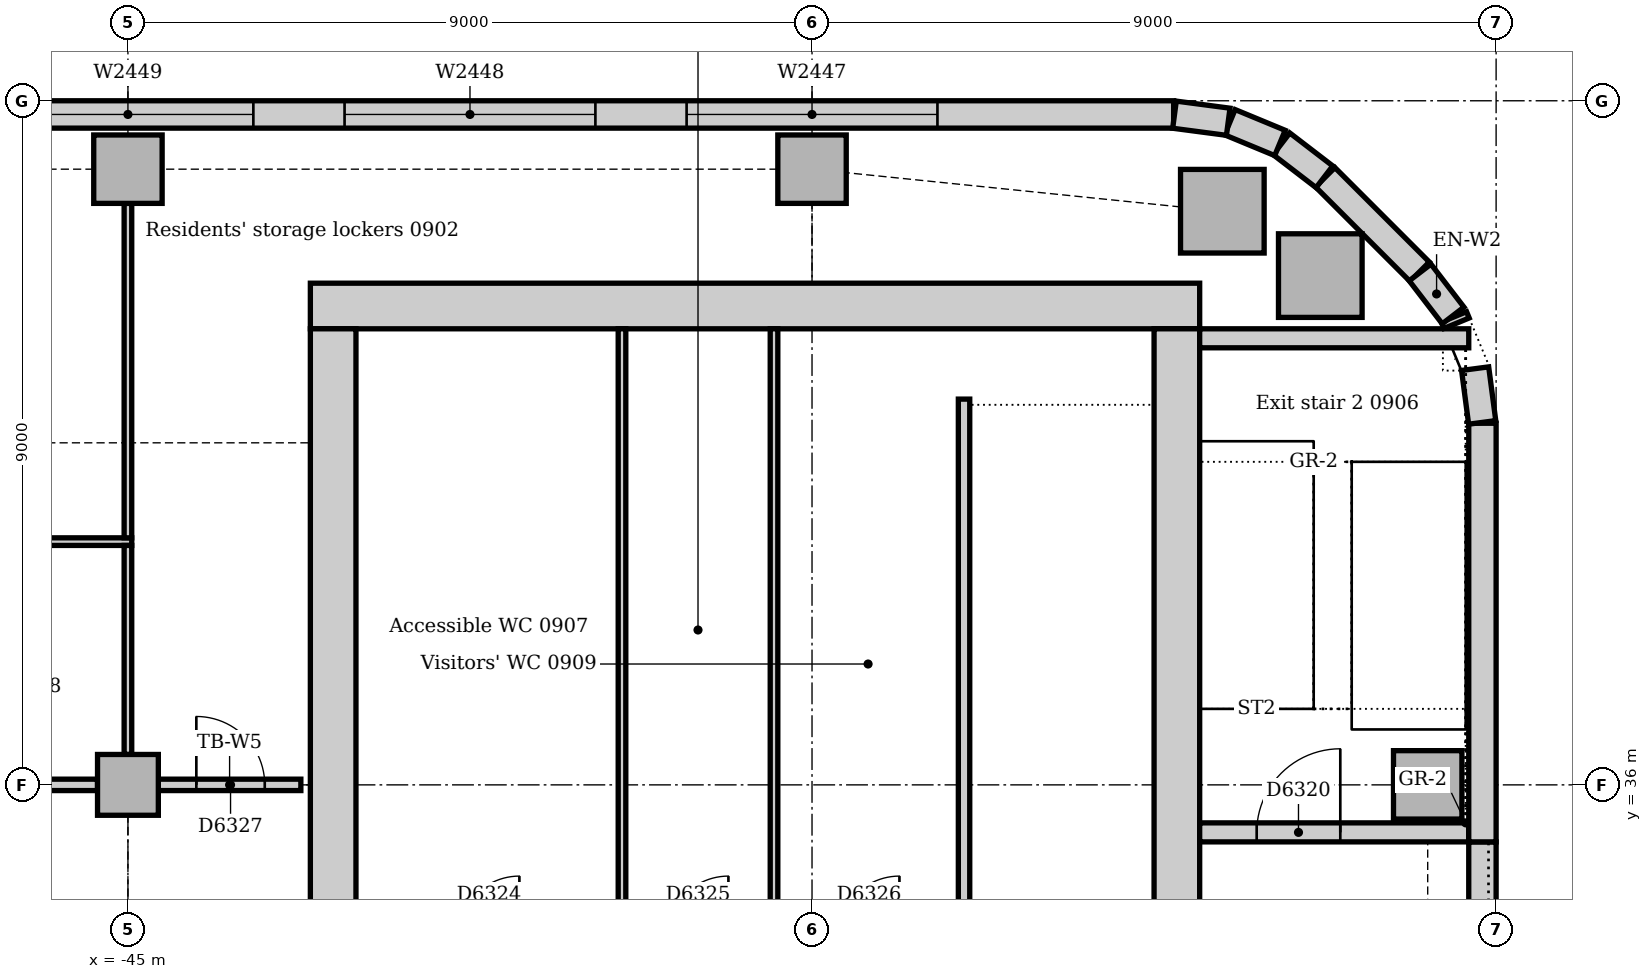
"""IFC4 building model, lengths in metres.
Left out: names, types, materials, properties, quantities, classifications, styles, units other than length and angle.
Written with IfcOpenShell. Run it as: python <this file> out.ifc"""

import sys

from ifc_helpers import new_model, si_unit, direction, frame, frame_2d, origin, origin_2d, place, context, subcontext, project, spatial, rectangle, extrude, element, fill, save


model = new_model("IFC4")
c1 = context("Model", 3, precision=1e-05, world=origin(), true_north=direction((0.0, 1.0)))
c2 = subcontext(c1, "Body", "Model", "MODEL_VIEW")
j1 = project(units=[si_unit("LENGTHUNIT", "METRE"), si_unit("PLANEANGLEUNIT", "RADIAN")], contexts=[c1])
p1 = place(None, origin())
s1 = spatial("IfcSite", under=j1, at=p1, CompositionType="ELEMENT")
p2 = place(p1, origin())
s2 = spatial("IfcBuilding", under=s1, at=p2, CompositionType="ELEMENT")
p3 = place(p2, frame((0.0, 0.0, 42.0)))
s3 = spatial("IfcBuildingStorey", under=s2, at=p3, CompositionType="ELEMENT", Elevation=42.0)
p4 = place(p3, frame((-30.9, 42.3, 0.0), z_axis=(0.0, 0.0, 1.0), x_axis=(-1.0, 0.0, 0.0)))
e1 = element("IfcWall", 1, at=p4, inside=s3, PredefinedType="SOLIDWALL", context=c2, shape_type="SweptSolid", body=[
    extrude(rectangle(XDim=11.7, YDim=0.6, at=frame_2d((5.85, 0.0))), origin(), (0.0, 0.0, 1.0), 4.0),
])
p5 = place(p3, frame((-31.2, 30.5, 0.0), z_axis=(0.0, 0.0, 1.0), x_axis=(0.0, 1.0, 0.0)))
e2 = element("IfcWall", 2, at=p5, inside=s3, PredefinedType="SOLIDWALL", context=c2, shape_type="SweptSolid", body=[
    extrude(rectangle(XDim=11.5, YDim=0.6, at=frame_2d((5.75, 0.0))), origin(), (0.0, 0.0, 1.0), 4.0),
])
p6 = place(p5, frame((0.85, 0.0, 0.0)))
e3 = element("IfcOpeningElement", 3, at=p6, cuts=e2, PredefinedType="OPENING", context=c2, shape_type="SweptSolid", body=[
    extrude(rectangle(XDim=1.8, YDim=2.1, at=frame_2d((0.9, 1.05))), frame((0.0, 0.31, 0.0), z_axis=(0.0, -1.0, 0.0), x_axis=(1.0, 0.0, 0.0)), (0.0, 0.0, 1.0), 0.62),
])
p7 = place(p3, frame((-42.3, 42.0, 0.0), z_axis=(0.0, 0.0, 1.0), x_axis=(0.0, -1.0, 0.0)))
e4 = element("IfcWall", 4, at=p7, inside=s3, PredefinedType="SOLIDWALL", context=c2, shape_type="SweptSolid", body=[
    extrude(rectangle(XDim=11.5, YDim=0.6, at=frame_2d((5.75, 0.0))), origin(), (0.0, 0.0, 1.0), 4.0),
])
p8 = place(p7, frame((8.85, 0.0, 0.0)))
e5 = element("IfcOpeningElement", 5, at=p8, cuts=e4, PredefinedType="OPENING", context=c2, shape_type="SweptSolid", body=[
    extrude(rectangle(XDim=1.8, YDim=2.1, at=frame_2d((0.9, 1.05))), frame((0.0, 0.31, 0.0), z_axis=(0.0, -1.0, 0.0), x_axis=(1.0, 0.0, 0.0)), (0.0, 0.0, 1.0), 0.62),
])
p9 = place(p3, frame((-30.9, 35.375, 0.0), z_axis=(0.0, 0.0, 1.0), x_axis=(1.0, 0.0, 0.0)))
e6 = element("IfcWall", 6, at=p9, inside=s3, PredefinedType="SOLIDWALL", context=c2, shape_type="SweptSolid", body=[
    extrude(rectangle(XDim=3.54, YDim=0.25, at=frame_2d((1.77, 0.0))), origin(), (0.0, 0.0, 1.0), 4.0),
])
p10 = place(p9, frame((0.75, 0.0, 0.0)))
e7 = element("IfcOpeningElement", 7, at=p10, cuts=e6, PredefinedType="OPENING", context=c2, shape_type="SweptSolid", body=[
    extrude(rectangle(XDim=1.1, YDim=2.1, at=frame_2d((0.55, 1.05))), frame((0.0, 0.135, 0.0), z_axis=(0.0, -1.0, 0.0), x_axis=(1.0, 0.0, 0.0)), (0.0, 0.0, 1.0), 0.27),
])
p11 = place(p3, frame((-27.36, 41.875, 0.0), z_axis=(0.0, 0.0, 1.0), x_axis=(-1.0, 0.0, 0.0)))
e8 = element("IfcWall", 8, at=p11, inside=s3, PredefinedType="SOLIDWALL", context=c2, shape_type="SweptSolid", body=[
    extrude(rectangle(XDim=3.54, YDim=0.25, at=frame_2d((1.77, 0.0))), origin(), (0.0, 0.0, 1.0), 4.0),
])
for number, where, z_axis, x_axis in (
    (9, (-29.313, 42.7, 0.0), (0.0, 0.0, 1.0), (1.0, 0.0, 0.0)),
    (10, (-30.602, 43.547, 0.0), (0.0, 0.0, 1.0), (1.0, 0.0, 0.0)),
):
    element("IfcColumn", number, at=place(p3, frame(where, z_axis=z_axis, x_axis=x_axis)), inside=s3, PredefinedType="COLUMN", context=c2, shape_type="SweptSolid", body=[
        extrude(rectangle(XDim=1.1, YDim=1.1, at=origin_2d()), origin(), (0.0, 0.0, 1.0), 3.7),
    ])
p12 = place(p3, frame((-27.9, 36.0, 0.0), z_axis=(0.0, 0.0, 1.0), x_axis=(1.0, 0.0, 0.0)))
e11 = element("IfcColumn", 11, at=p12, inside=s3, PredefinedType="COLUMN", context=c2, shape_type="SweptSolid", body=[
    extrude(rectangle(XDim=0.9, YDim=0.9, at=origin_2d()), origin(), (0.0, 0.0, 1.0), 4.0),
])
for number, where, z_axis, x_axis in (
    (12, (-45.0, 44.1, 0.0), (0.0, 0.0, 1.0), (1.0, 0.0, 0.0)),
    (13, (-36.0, 44.1, 0.0), (0.0, 0.0, 1.0), (1.0, 0.0, 0.0)),
):
    element("IfcColumn", number, at=place(p3, frame(where, z_axis=z_axis, x_axis=x_axis)), inside=s3, PredefinedType="COLUMN", context=c2, shape_type="SweptSolid", body=[
        extrude(rectangle(XDim=0.9, YDim=0.9, at=origin_2d()), origin(), (0.0, 0.0, 1.0), 3.7),
    ])
p13 = place(p3, frame((-45.0, 36.0, 0.0), z_axis=(0.0, 0.0, 1.0), x_axis=(1.0, 0.0, 0.0)))
e14 = element("IfcColumn", 14, at=p13, inside=s3, PredefinedType="COLUMN", context=c2, shape_type="SweptSolid", body=[
    extrude(rectangle(XDim=0.8, YDim=0.8, at=origin_2d()), origin(), (0.0, 0.0, 1.0), 3.7),
])
p14 = place(p3, frame((-27.18, 27.75, 0.0), z_axis=(0.0, 0.0, 1.0), x_axis=(0.0, 1.0, 0.0)))
e15 = element("IfcWall", 15, at=p14, inside=s3, PredefinedType="STANDARD", context=c2, shape_type="SweptSolid", body=[
    extrude(rectangle(XDim=7.5, YDim=0.36, at=frame_2d((3.75, 0.0))), origin(), (0.0, 0.0, 1.0), 3.7),
])
p15 = place(p14, frame((2.85, 0.0, 1.2)))
e16 = element("IfcOpeningElement", 16, at=p15, cuts=e15, PredefinedType="OPENING", context=c2, shape_type="SweptSolid", body=[
    extrude(rectangle(XDim=1.8, YDim=1.2, at=frame_2d((0.9, 0.6))), frame((0.0, 0.19, 0.0), z_axis=(0.0, -1.0, 0.0), x_axis=(1.0, 0.0, 0.0)), (0.0, 0.0, 1.0), 0.38),
])
p16 = place(p3, frame((-27.18, 35.25, 0.0), z_axis=(0.0, 0.0, 1.0), x_axis=(0.0, 1.0, 0.0)))
e17 = element("IfcWall", 17, at=p16, inside=s3, PredefinedType="STANDARD", context=c2, shape_type="SweptSolid", body=[
    extrude(rectangle(XDim=5.507, YDim=0.36, at=frame_2d((2.754, 0.0))), origin(), (0.0, 0.0, 1.0), 3.7),
])
p17 = place(p3, frame((-28.006, 42.751, 0.0), z_axis=(0.0, 0.0, 1.0), x_axis=(-0.707106781187, 0.707106781187, 0.0)))
e18 = element("IfcWall", 18, at=p17, inside=s3, PredefinedType="STANDARD", context=c2, shape_type="SweptSolid", body=[
    extrude(rectangle(XDim=1.757, YDim=0.36, at=frame_2d((0.879, 0.0))), origin(), (0.0, 0.0, 1.0), 3.7),
])
p18 = place(p3, frame((-31.243, 44.82, 0.0), z_axis=(0.0, 0.0, 1.0), x_axis=(-1.0, 0.0, 0.0)))
e19 = element("IfcWall", 19, at=p18, inside=s3, PredefinedType="STANDARD", context=c2, shape_type="SweptSolid", body=[
    extrude(rectangle(XDim=36.515, YDim=0.36, at=frame_2d((18.257, 0.0))), origin(), (0.0, 0.0, 1.0), 3.7),
])
p19 = place(p18, frame((3.107, 0.0, 0.9)))
e20 = element("IfcOpeningElement", 20, at=p19, cuts=e19, PredefinedType="OPENING", context=c2, shape_type="SweptSolid", body=[
    extrude(rectangle(XDim=3.3, YDim=1.6, at=frame_2d((1.65, 0.8))), frame((0.0, 0.19, 0.0), z_axis=(0.0, -1.0, 0.0), x_axis=(1.0, 0.0, 0.0)), (0.0, 0.0, 1.0), 0.38),
])
p20 = place(p18, frame((7.607, 0.0, 0.9)))
e21 = element("IfcOpeningElement", 21, at=p20, cuts=e19, PredefinedType="OPENING", context=c2, shape_type="SweptSolid", body=[
    extrude(rectangle(XDim=3.3, YDim=1.6, at=frame_2d((1.65, 0.8))), frame((0.0, 0.19, 0.0), z_axis=(0.0, -1.0, 0.0), x_axis=(1.0, 0.0, 0.0)), (0.0, 0.0, 1.0), 0.38),
])
p21 = place(p18, frame((12.107, 0.0, 0.9)))
e22 = element("IfcOpeningElement", 22, at=p21, cuts=e19, PredefinedType="OPENING", context=c2, shape_type="SweptSolid", body=[
    extrude(rectangle(XDim=3.3, YDim=1.6, at=frame_2d((1.65, 0.8))), frame((0.0, 0.19, 0.0), z_axis=(0.0, -1.0, 0.0), x_axis=(1.0, 0.0, 0.0)), (0.0, 0.0, 1.0), 0.38),
])
p22 = place(p18, frame((16.607, 0.0, 0.9)))
e23 = element("IfcOpeningElement", 23, at=p22, cuts=e19, PredefinedType="OPENING", context=c2, shape_type="SweptSolid", body=[
    extrude(rectangle(XDim=3.3, YDim=1.6, at=frame_2d((1.65, 0.8))), frame((0.0, 0.19, 0.0), z_axis=(0.0, -1.0, 0.0), x_axis=(1.0, 0.0, 0.0)), (0.0, 0.0, 1.0), 0.38),
])
p23 = place(p18, frame((21.107, 0.0, 0.9)))
e24 = element("IfcOpeningElement", 24, at=p23, cuts=e19, PredefinedType="OPENING", context=c2, shape_type="SweptSolid", body=[
    extrude(rectangle(XDim=3.3, YDim=1.6, at=frame_2d((1.65, 0.8))), frame((0.0, 0.19, 0.0), z_axis=(0.0, -1.0, 0.0), x_axis=(1.0, 0.0, 0.0)), (0.0, 0.0, 1.0), 0.38),
])
p24 = place(p18, frame((25.607, 0.0, 0.9)))
e25 = element("IfcOpeningElement", 25, at=p24, cuts=e19, PredefinedType="OPENING", context=c2, shape_type="SweptSolid", body=[
    extrude(rectangle(XDim=3.3, YDim=1.6, at=frame_2d((1.65, 0.8))), frame((0.0, 0.19, 0.0), z_axis=(0.0, -1.0, 0.0), x_axis=(1.0, 0.0, 0.0)), (0.0, 0.0, 1.0), 0.38),
])
p25 = place(p18, frame((30.107, 0.0, 0.9)))
e26 = element("IfcOpeningElement", 26, at=p25, cuts=e19, PredefinedType="OPENING", context=c2, shape_type="SweptSolid", body=[
    extrude(rectangle(XDim=3.3, YDim=1.6, at=frame_2d((1.65, 0.8))), frame((0.0, 0.19, 0.0), z_axis=(0.0, -1.0, 0.0), x_axis=(1.0, 0.0, 0.0)), (0.0, 0.0, 1.0), 0.38),
])
p26 = place(p3, frame((-27.183, 40.769, 0.0), z_axis=(0.0, 0.0, 1.0), x_axis=(-0.13055608231, 0.99144092581, 0.0)))
e27 = element("IfcWall", 27, at=p26, inside=s3, PredefinedType="STANDARD", context=c2, shape_type="SweptSolid", body=[
    extrude(rectangle(XDim=0.713, YDim=0.36, at=frame_2d((0.356, 0.0))), origin(), (0.0, 0.0, 1.0), 3.7),
])
p27 = place(p3, frame((-27.521, 42.074, 0.0), z_axis=(0.0, 0.0, 1.0), x_axis=(-0.382549378284, 0.923935048136, 0.0)))
e28 = element("IfcWall", 28, at=p27, inside=s3, PredefinedType="STANDARD", context=c2, shape_type="SweptSolid", body=[
    extrude(rectangle(XDim=0.089, YDim=0.36, at=frame_2d((0.045, 0.0))), origin(), (0.0, 0.0, 1.0), 3.7),
])
for number, where, z_axis, x_axis in (
    (29, (-27.566, 42.175, 0.0), (0.0, 0.0, 1.0), (-0.609, 0.793, 0.0)),
    (30, (-29.259, 44.0, 0.0), (0.0, 0.0, 1.0), (-0.793, 0.609, 0.0)),
):
    element("IfcWall", number, at=place(p3, frame(where, z_axis=z_axis, x_axis=x_axis)), inside=s3, PredefinedType="STANDARD", context=c2, shape_type="SweptSolid", body=[
        extrude(rectangle(XDim=0.713, YDim=0.36, at=frame_2d((0.357, 0.0))), origin(), (0.0, 0.0, 1.0), 3.7),
    ])
for number, where, z_axis, x_axis in (
    (31, (-29.844, 44.445, 0.0), (0.0, 0.0, 1.0), (-0.924, 0.383, 0.0)),
    (32, (-30.524, 44.724, 0.0), (0.0, 0.0, 1.0), (-0.991, 0.131, 0.0)),
):
    element("IfcWall", number, at=place(p3, frame(where, z_axis=z_axis, x_axis=x_axis)), inside=s3, PredefinedType="STANDARD", context=c2, shape_type="SweptSolid", body=[
        extrude(rectangle(XDim=0.713, YDim=0.36, at=frame_2d((0.356, 0.0))), origin(), (0.0, 0.0, 1.0), 3.7),
    ])
p28 = place(p3, frame((-34.0, 41.075, 0.0), z_axis=(0.0, 0.0, 1.0), x_axis=(0.0, -1.0, 0.0)))
e33 = element("IfcWall", 33, at=p28, inside=s3, PredefinedType="SOLIDWALL", context=c2, shape_type="SweptSolid", body=[
    extrude(rectangle(XDim=7.0, YDim=0.15, at=frame_2d((3.5, 0.0))), origin(), (0.0, 0.0, 1.0), 4.0),
])
for number, where, z_axis, x_axis in (
    (34, (-38.5, 34.075, 0.0), (0.0, 0.0, 1.0), (0.0, 1.0, 0.0)),
    (35, (-36.5, 34.075, 0.0), (0.0, 0.0, 1.0), (0.0, 1.0, 0.0)),
):
    element("IfcWall", number, at=place(p3, frame(where, z_axis=z_axis, x_axis=x_axis)), inside=s3, PredefinedType="PARTITIONING", context=c2, shape_type="SweptSolid", body=[
        extrude(rectangle(XDim=7.925, YDim=0.1, at=frame_2d((3.962, 0.0))), origin(), (0.0, 0.0, 1.0), 3.7),
    ])
p29 = place(p3, frame((-44.6, 36.0, 0.0), z_axis=(0.0, 0.0, 1.0), x_axis=(1.0, 0.0, 0.0)))
e36 = element("IfcWall", 36, at=p29, inside=s3, PredefinedType="PARTITIONING", context=c2, shape_type="SweptSolid", body=[
    extrude(rectangle(XDim=1.875, YDim=0.15, at=frame_2d((0.938, 0.0))), origin(), (0.0, 0.0, 1.0), 3.452),
])
p30 = place(p29, frame((0.5, 0.0, 0.0)))
e37 = element("IfcOpeningElement", 37, at=p30, cuts=e36, PredefinedType="OPENING", context=c2, shape_type="SweptSolid", body=[
    extrude(rectangle(XDim=0.9, YDim=2.1, at=frame_2d((0.45, 1.05))), frame((0.0, 0.085, 0.0), z_axis=(0.0, -1.0, 0.0), x_axis=(1.0, 0.0, 0.0)), (0.0, 0.0, 1.0), 0.17),
])
p31 = place(p3, frame((-53.6, 36.0, 0.0), z_axis=(0.0, 0.0, 1.0), x_axis=(1.0, 0.0, 0.0)))
e38 = element("IfcWall", 38, at=p31, inside=s3, PredefinedType="PARTITIONING", context=c2, shape_type="SweptSolid", body=[
    extrude(rectangle(XDim=8.2, YDim=0.15, at=frame_2d((4.1, 0.0))), origin(), (0.0, 0.0, 1.0), 3.0),
])
p32 = place(p31, frame((2.89, 0.0, 0.0)))
e39 = element("IfcOpeningElement", 39, at=p32, cuts=e38, PredefinedType="OPENING", context=c2, shape_type="SweptSolid", body=[
    extrude(rectangle(XDim=1.0, YDim=2.1, at=frame_2d((0.5, 1.05))), frame((0.0, 0.085, 0.0), z_axis=(0.0, -1.0, 0.0), x_axis=(1.0, 0.0, 0.0)), (0.0, 0.0, 1.0), 0.17),
])
p33 = place(p3, frame((-53.925, 39.2, 0.0), z_axis=(0.0, 0.0, 1.0), x_axis=(1.0, 0.0, 0.0)))
e40 = element("IfcWall", 40, at=p33, inside=s3, PredefinedType="PARTITIONING", context=c2, shape_type="SweptSolid", body=[
    extrude(rectangle(XDim=8.975, YDim=0.1, at=frame_2d((4.487, 0.0))), origin(), (0.0, 0.0, 1.0), 3.7),
])
p34 = place(p33, frame((3.265, 0.0, 0.0)))
e41 = element("IfcOpeningElement", 41, at=p34, cuts=e40, PredefinedType="OPENING", context=c2, shape_type="SweptSolid", body=[
    extrude(rectangle(XDim=0.9, YDim=2.1, at=frame_2d((0.45, 1.05))), frame((0.0, 0.06, 0.0), z_axis=(0.0, -1.0, 0.0), x_axis=(1.0, 0.0, 0.0)), (0.0, 0.0, 1.0), 0.12),
])
p35 = place(p3, frame((-45.0, 39.25, 0.0), z_axis=(0.0, 0.0, 1.0), x_axis=(0.0, 1.0, 0.0)))
e42 = element("IfcWall", 42, at=p35, inside=s3, PredefinedType="PARTITIONING", context=c2, shape_type="SweptSolid", body=[
    extrude(rectangle(XDim=4.4, YDim=0.1, at=frame_2d((2.2, 0.0))), origin(), (0.0, 0.0, 1.0), 3.008),
])
p36 = place(p3, frame((-45.0, 36.4, 0.0), z_axis=(0.0, 0.0, 1.0), x_axis=(0.0, 1.0, 0.0)))
e43 = element("IfcWall", 43, at=p36, inside=s3, PredefinedType="PARTITIONING", context=c2, shape_type="SweptSolid", body=[
    extrude(rectangle(XDim=2.75, YDim=0.1, at=frame_2d((1.375, 0.0))), origin(), (0.0, 0.0, 1.0), 3.008),
])
p37 = place(p19, origin())
e44 = element("IfcWindow", 44, at=p37, inside=s3, PartitioningType="SINGLE_PANEL", PredefinedType="WINDOW", context=c2, shape_type="SweptSolid", body=[
    extrude(rectangle(XDim=3.3, YDim=1.6, at=frame_2d((1.65, 0.8))), frame((0.0, 0.13, 0.0), z_axis=(0.0, -1.0, 0.0), x_axis=(1.0, 0.0, 0.0)), (0.0, 0.0, 1.0), 0.06),
])
fill(e20, e44)
p38 = place(p20, origin())
e45 = element("IfcWindow", 45, at=p38, inside=s3, PartitioningType="SINGLE_PANEL", PredefinedType="WINDOW", context=c2, shape_type="SweptSolid", body=[
    extrude(rectangle(XDim=3.3, YDim=1.6, at=frame_2d((1.65, 0.8))), frame((0.0, 0.13, 0.0), z_axis=(0.0, -1.0, 0.0), x_axis=(1.0, 0.0, 0.0)), (0.0, 0.0, 1.0), 0.06),
])
fill(e21, e45)
p39 = place(p21, origin())
e46 = element("IfcWindow", 46, at=p39, inside=s3, PartitioningType="SINGLE_PANEL", PredefinedType="WINDOW", context=c2, shape_type="SweptSolid", body=[
    extrude(rectangle(XDim=3.3, YDim=1.6, at=frame_2d((1.65, 0.8))), frame((0.0, 0.13, 0.0), z_axis=(0.0, -1.0, 0.0), x_axis=(1.0, 0.0, 0.0)), (0.0, 0.0, 1.0), 0.06),
])
fill(e22, e46)
p40 = place(p10, origin())
e47 = element("IfcDoor", 47, at=p40, inside=s3, OperationType="SINGLE_SWING_RIGHT", PredefinedType="DOOR", context=c2, shape_type="SweptSolid", body=[
    extrude(rectangle(XDim=1.1, YDim=2.1, at=frame_2d((0.55, 1.05))), frame((0.0, 0.025, 0.0), z_axis=(0.0, -1.0, 0.0), x_axis=(1.0, 0.0, 0.0)), (0.0, 0.0, 1.0), 0.05),
])
fill(e7, e47)
p41 = place(p30, origin())
e48 = element("IfcDoor", 48, at=p41, inside=s3, OperationType="SINGLE_SWING_LEFT", PredefinedType="DOOR", context=c2, shape_type="SweptSolid", body=[
    extrude(rectangle(XDim=0.9, YDim=2.1, at=frame_2d((0.45, 1.05))), frame((0.0, 0.025, 0.0), z_axis=(0.0, -1.0, 0.0), x_axis=(1.0, 0.0, 0.0)), (0.0, 0.0, 1.0), 0.05),
])
fill(e37, e48)
save(model, sys.argv[1])
